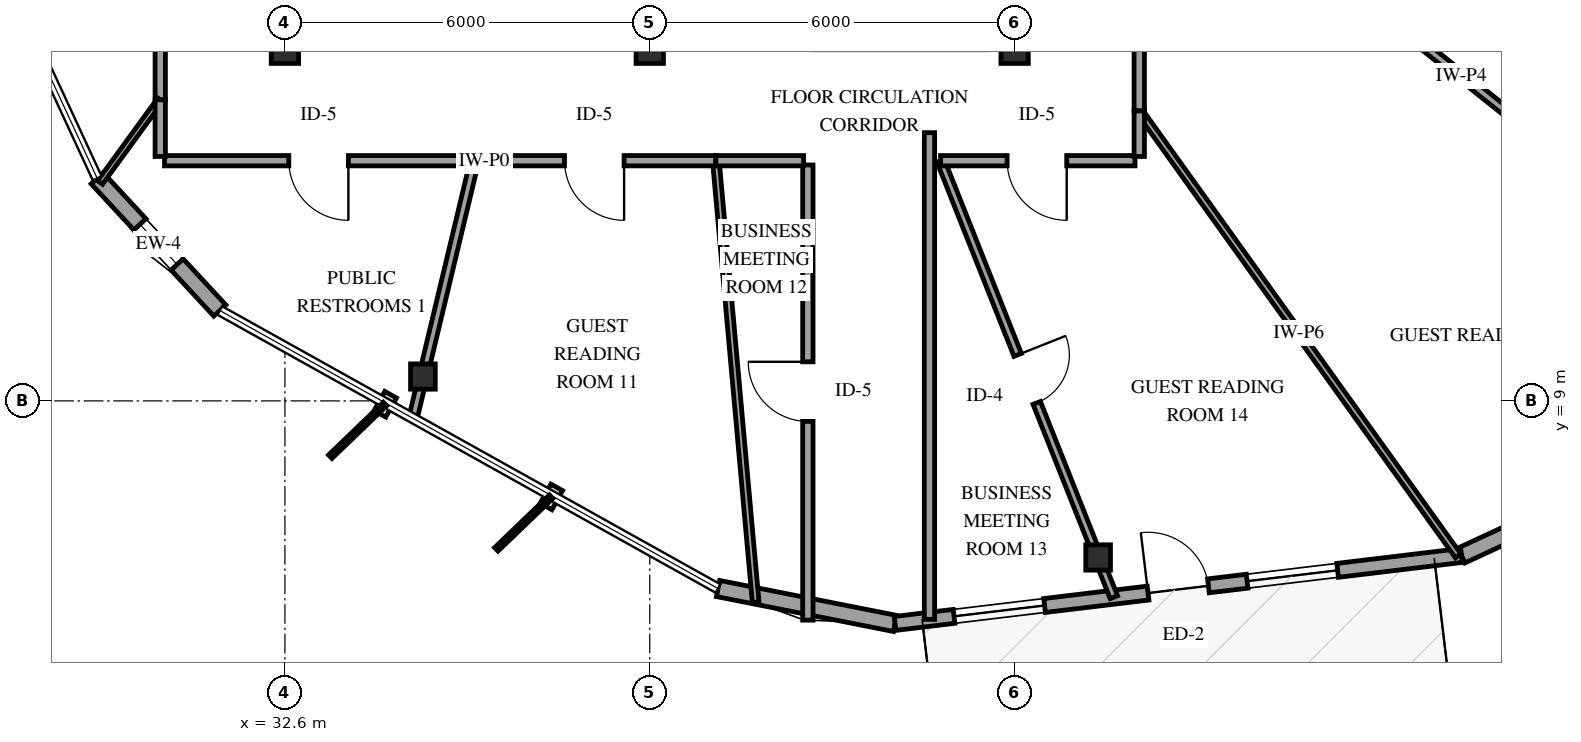
"""IFC4 building model, lengths in metres.
Left out: names, types, materials, properties, quantities, classifications, styles, units other than length and angle.
Written with IfcOpenShell. Run it as: python <this file> out.ifc"""

import sys

from ifc_helpers import new_model, si_unit, direction, frame, frame_2d, origin, origin_2d, place, context, subcontext, project, spatial, rectangle, i_section, extrude, element, fill, save


model = new_model("IFC4")
c1 = context("Model", 3, precision=1e-05, world=origin(), true_north=direction((0.0, 1.0)))
c2 = subcontext(c1, "Body", "Model", "MODEL_VIEW")
j1 = project(units=[si_unit("LENGTHUNIT", "METRE"), si_unit("PLANEANGLEUNIT", "RADIAN")], contexts=[c1])
p1 = place(None, origin())
s1 = spatial("IfcSite", under=j1, at=p1, CompositionType="ELEMENT")
p2 = place(p1, origin())
s2 = spatial("IfcBuilding", under=s1, at=p2, CompositionType="ELEMENT")
p3 = place(p2, frame((0.0, 0.0, 190.6)))
s3 = spatial("IfcBuildingStorey", under=s2, at=p3, CompositionType="ELEMENT", Elevation=190.6)
for number, where, z_axis, x_axis in (
    (1, (32.6, 15.0, -0.3), (0.0, 0.0, 1.0), (1.0, 0.0, 0.0)),
    (2, (38.6, 15.0, -0.3), (0.0, 0.0, 1.0), (1.0, 0.0, 0.0)),
    (3, (44.6, 15.0, -0.3), (0.0, 0.0, 1.0), (1.0, 0.0, 0.0)),
):
    element("IfcColumn", number, at=place(p3, frame(where, z_axis=z_axis, x_axis=x_axis)), inside=s3, PredefinedType="PILASTER", context=c2, shape_type="SweptSolid", body=[
        extrude(rectangle(XDim=0.45, YDim=0.9, at=origin_2d()), origin(), (0.0, 0.0, 1.0), 3.9),
    ])
for number, where, z_axis, x_axis in (
    (4, (34.87, 9.401, -0.3), (0.0, 0.0, 1.0), (1.0, 0.0, 0.0)),
    (5, (45.973, 6.426, -0.3), (0.0, 0.0, 1.0), (1.0, 0.0, 0.0)),
):
    element("IfcColumn", number, at=place(p3, frame(where, z_axis=z_axis, x_axis=x_axis)), inside=s3, PredefinedType="COLUMN", context=c2, shape_type="SweptSolid", body=[
        extrude(i_section(OverallWidth=0.406, OverallDepth=0.416, WebThickness=0.03, FlangeThickness=0.048, FilletRadius=0.038, at=origin_2d()), origin(), (0.0, 0.0, 1.0), 3.9),
    ])
p4 = place(p3, frame((29.513, 12.661, 0.0), z_axis=(0.0, 0.0, 1.0), x_axis=(0.679939563614, -0.733268156838, 0.0)))
e6 = element("IfcWall", 6, at=p4, inside=s3, PredefinedType="SOLIDWALL", context=c2, shape_type="SweptSolid", body=[
    extrude(rectangle(XDim=2.967, YDim=0.27, at=frame_2d((1.483, 0.0))), origin(), (0.0, 0.0, 1.0), 2.679),
])
p5 = place(p4, frame((1.033, 0.0, 0.75)))
e7 = element("IfcOpeningElement", 7, at=p5, cuts=e6, PredefinedType="OPENING", context=c2, shape_type="SweptSolid", body=[
    extrude(rectangle(XDim=0.9, YDim=1.5, at=frame_2d((0.45, 0.75))), frame((0.0, 0.145, 0.0), z_axis=(0.0, -1.0, 0.0), x_axis=(1.0, 0.0, 0.0)), (0.0, 0.0, 1.0), 0.29),
])
p6 = place(p3, frame((39.723, 5.915, 0.0), z_axis=(0.0, 0.0, 1.0), x_axis=(0.981090069254, -0.193551739883, 0.0)))
e8 = element("IfcWall", 8, at=p6, inside=s3, PredefinedType="SOLIDWALL", context=c2, shape_type="SweptSolid", body=[
    extrude(rectangle(XDim=2.967, YDim=0.27, at=frame_2d((1.483, 0.0))), origin(), (0.0, 0.0, 1.0), 2.679),
])
p7 = place(p3, frame((51.949, 6.458, 0.0), z_axis=(0.0, 0.0, 1.0), x_axis=(0.907501185291, 0.420049519337, 0.0)))
e9 = element("IfcWall", 9, at=p7, inside=s3, PredefinedType="SOLIDWALL", context=c2, shape_type="SweptSolid", body=[
    extrude(rectangle(XDim=2.967, YDim=0.27, at=frame_2d((1.483, 0.0))), origin(), (0.0, 0.0, 1.0), 2.679),
])
p8 = place(p7, frame((1.033, 0.0, 0.75)))
e10 = element("IfcOpeningElement", 10, at=p8, cuts=e9, PredefinedType="OPENING", context=c2, shape_type="SweptSolid", body=[
    extrude(rectangle(XDim=0.9, YDim=1.5, at=frame_2d((0.45, 0.75))), frame((0.0, 0.145, 0.0), z_axis=(0.0, -1.0, 0.0), x_axis=(1.0, 0.0, 0.0)), (0.0, 0.0, 1.0), 0.29),
])
p9 = place(p3, frame((42.634, 5.341, 0.0), z_axis=(0.0, 0.0, 1.0), x_axis=(0.992882132133, 0.119101098615, 0.0)))
e11 = element("IfcWall", 11, at=p9, inside=s3, PredefinedType="SOLIDWALL", context=c2, shape_type="SweptSolid", body=[
    extrude(rectangle(XDim=9.382, YDim=0.23, at=frame_2d((4.691, 0.0))), origin(), (0.0, 0.0, 1.0), 2.679),
])
p10 = place(p9, frame((4.191, 0.0, 0.0)))
e12 = element("IfcOpeningElement", 12, at=p10, cuts=e11, PredefinedType="OPENING", context=c2, shape_type="SweptSolid", body=[
    extrude(rectangle(XDim=1.0, YDim=2.15, at=frame_2d((0.5, 1.075))), frame((0.0, 0.125, 0.0), z_axis=(0.0, -1.0, 0.0), x_axis=(1.0, 0.0, 0.0)), (0.0, 0.0, 1.0), 0.25),
])
p11 = place(p9, frame((0.977, 0.0, 0.72)))
e13 = element("IfcOpeningElement", 13, at=p11, cuts=e11, PredefinedType="OPENING", context=c2, shape_type="SweptSolid", body=[
    extrude(rectangle(XDim=1.5, YDim=1.7, at=frame_2d((0.75, 0.85))), frame((0.0, 0.125, 0.0), z_axis=(0.0, -1.0, 0.0), x_axis=(1.0, 0.0, 0.0)), (0.0, 0.0, 1.0), 0.25),
])
p12 = place(p9, frame((5.831, 0.0, 0.72)))
e14 = element("IfcOpeningElement", 14, at=p12, cuts=e11, PredefinedType="OPENING", context=c2, shape_type="SweptSolid", body=[
    extrude(rectangle(XDim=1.5, YDim=1.7, at=frame_2d((0.75, 0.85))), frame((0.0, 0.125, 0.0), z_axis=(0.0, -1.0, 0.0), x_axis=(1.0, 0.0, 0.0)), (0.0, 0.0, 1.0), 0.25),
])
p13 = place(p3, frame((46.65, 21.405, 0.0), z_axis=(0.0, 0.0, 1.0), x_axis=(0.913073615339, -0.4077947682, 0.0)))
e15 = element("IfcWall", 15, at=p13, inside=s3, PredefinedType="PARTITIONING", context=c2, shape_type="SweptSolid", body=[
    extrude(rectangle(XDim=16.719, YDim=0.11, at=frame_2d((8.36, 0.0))), origin(), (0.0, 0.0, 1.0), 3.3),
])
p14 = place(p3, frame((46.65, 18.573, 0.0), z_axis=(0.0, 0.0, 1.0), x_axis=(0.781465935212, -0.623947908165, 0.0)))
e16 = element("IfcWall", 16, at=p14, inside=s3, PredefinedType="PARTITIONING", context=c2, shape_type="SweptSolid", body=[
    extrude(rectangle(XDim=13.554, YDim=0.14, at=frame_2d((6.777, 0.0))), origin(), (0.0, 0.0, 1.0), 3.3),
])
p15 = place(p3, frame((46.65, 13.769, 0.0), z_axis=(0.0, 0.0, 1.0), x_axis=(0.582553277152, -0.812792519207, 0.0)))
e17 = element("IfcWall", 17, at=p15, inside=s3, PredefinedType="PARTITIONING", context=c2, shape_type="SweptSolid", body=[
    extrude(rectangle(XDim=9.004, YDim=0.11, at=frame_2d((4.502, 0.0))), origin(), (0.0, 0.0, 1.0), 2.678),
])
p16 = place(p3, frame((43.383, 12.95, 0.0), z_axis=(0.0, 0.0, 1.0), x_axis=(0.3688984108, -0.929469721136, 0.0)))
e18 = element("IfcWall", 18, at=p16, inside=s3, PredefinedType="PARTITIONING", context=c2, shape_type="SweptSolid", body=[
    extrude(rectangle(XDim=7.723, YDim=0.13, at=frame_2d((3.861, 0.0))), origin(), (0.0, 0.0, 1.0), 2.595),
])
p17 = place(p16, frame((3.436, 0.0, 0.0)))
e19 = element("IfcOpeningElement", 19, at=p17, cuts=e18, PredefinedType="OPENING", context=c2, shape_type="SweptSolid", body=[
    extrude(rectangle(XDim=0.85, YDim=2.1, at=frame_2d((0.425, 1.05))), frame((0.0, 0.075, 0.0), z_axis=(0.0, -1.0, 0.0), x_axis=(1.0, 0.0, 0.0)), (0.0, 0.0, 1.0), 0.15),
])
p18 = place(p3, frame((41.2, 5.395, 0.0), z_axis=(0.0, 0.0, 1.0), x_axis=(0.0, 1.0, 0.0)))
e20 = element("IfcWall", 20, at=p18, inside=s3, PredefinedType="PARTITIONING", context=c2, shape_type="SweptSolid", body=[
    extrude(rectangle(XDim=7.485, YDim=0.17, at=frame_2d((3.742, 0.0))), origin(), (0.0, 0.0, 1.0), 3.3),
])
p19 = place(p18, frame((3.268, 0.0, 0.0)))
e21 = element("IfcOpeningElement", 21, at=p19, cuts=e20, PredefinedType="OPENING", context=c2, shape_type="SweptSolid", body=[
    extrude(rectangle(XDim=0.98, YDim=2.15, at=frame_2d((0.49, 1.075))), frame((0.0, 0.095, 0.0), z_axis=(0.0, -1.0, 0.0), x_axis=(1.0, 0.0, 0.0)), (0.0, 0.0, 1.0), 0.19),
])
p20 = place(p3, frame((39.687, 12.95, 0.0), z_axis=(0.0, 0.0, 1.0), x_axis=(0.089835321786, -0.995956633072, 0.0)))
e22 = element("IfcWall", 22, at=p20, inside=s3, PredefinedType="PARTITIONING", context=c2, shape_type="SweptSolid", body=[
    extrude(rectangle(XDim=7.292, YDim=0.11, at=frame_2d((3.646, 0.0))), origin(), (0.0, 0.0, 1.0), 2.678),
])
p21 = place(p3, frame((30.55, 13.951, 0.0), z_axis=(0.0, 0.0, 1.0), x_axis=(0.0, 1.0, 0.0)))
e23 = element("IfcWall", 23, at=p21, inside=s3, PredefinedType="PARTITIONING", context=c2, shape_type="SweptSolid", body=[
    extrude(rectangle(XDim=6.155, YDim=0.17, at=frame_2d((3.078, 0.0))), origin(), (0.0, 0.0, 1.0), 3.3),
])
p22 = place(p21, frame((2.603, 0.0, 0.0)))
e24 = element("IfcOpeningElement", 24, at=p22, cuts=e23, PredefinedType="OPENING", context=c2, shape_type="SweptSolid", body=[
    extrude(rectangle(XDim=0.98, YDim=2.15, at=frame_2d((0.49, 1.075))), frame((0.0, 0.095, 0.0), z_axis=(0.0, -1.0, 0.0), x_axis=(1.0, 0.0, 0.0)), (0.0, 0.0, 1.0), 0.19),
])
p23 = place(p3, frame((35.719, 12.95, 0.0), z_axis=(0.0, 0.0, 1.0), x_axis=(-1.0, 0.0, 0.0)))
e25 = element("IfcWall", 25, at=p23, inside=s3, PredefinedType="PARTITIONING", context=c2, shape_type="SweptSolid", body=[
    extrude(rectangle(XDim=5.099, YDim=0.17, at=frame_2d((2.549, 0.0))), origin(), (0.0, 0.0, 1.0), 3.3),
])
p24 = place(p23, frame((2.075, 0.0, 0.0)))
e26 = element("IfcOpeningElement", 26, at=p24, cuts=e25, PredefinedType="OPENING", context=c2, shape_type="SweptSolid", body=[
    extrude(rectangle(XDim=0.98, YDim=2.15, at=frame_2d((0.49, 1.075))), frame((0.0, 0.095, 0.0), z_axis=(0.0, -1.0, 0.0), x_axis=(1.0, 0.0, 0.0)), (0.0, 0.0, 1.0), 0.19),
])
p25 = place(p3, frame((46.65, 18.573, 0.0), z_axis=(0.0, 0.0, 1.0), x_axis=(0.0, -1.0, 0.0)))
e27 = element("IfcWall", 27, at=p25, inside=s3, PredefinedType="PARTITIONING", context=c2, shape_type="SweptSolid", body=[
    extrude(rectangle(XDim=4.804, YDim=0.17, at=frame_2d((2.402, 0.0))), origin(), (0.0, 0.0, 1.0), 3.3),
])
p26 = place(p25, frame((1.927, 0.0, 0.0)))
e28 = element("IfcOpeningElement", 28, at=p26, cuts=e27, PredefinedType="OPENING", context=c2, shape_type="SweptSolid", body=[
    extrude(rectangle(XDim=0.98, YDim=2.15, at=frame_2d((0.49, 1.075))), frame((0.0, 0.095, 0.0), z_axis=(0.0, -1.0, 0.0), x_axis=(1.0, 0.0, 0.0)), (0.0, 0.0, 1.0), 0.19),
])
p27 = place(p3, frame((35.719, 12.95, 0.0), z_axis=(0.0, 0.0, 1.0), x_axis=(-0.232789903954, -0.972527048784, 0.0)))
e29 = element("IfcWall", 29, at=p27, inside=s3, PredefinedType="PARTITIONING", context=c2, shape_type="SweptSolid", body=[
    extrude(rectangle(XDim=4.355, YDim=0.14, at=frame_2d((2.178, 0.0))), origin(), (0.0, 0.0, 1.0), 2.595),
])
p28 = place(p3, frame((39.687, 12.95, 0.0), z_axis=(0.0, 0.0, 1.0), x_axis=(-1.0, 0.0, 0.0)))
e30 = element("IfcWall", 30, at=p28, inside=s3, PredefinedType="PARTITIONING", context=c2, shape_type="SweptSolid", body=[
    extrude(rectangle(XDim=3.968, YDim=0.17, at=frame_2d((1.984, 0.0))), origin(), (0.0, 0.0, 1.0), 3.3),
])
p29 = place(p28, frame((1.509, 0.0, 0.0)))
e31 = element("IfcOpeningElement", 31, at=p29, cuts=e30, PredefinedType="OPENING", context=c2, shape_type="SweptSolid", body=[
    extrude(rectangle(XDim=0.98, YDim=2.15, at=frame_2d((0.49, 1.075))), frame((0.0, 0.095, 0.0), z_axis=(0.0, -1.0, 0.0), x_axis=(1.0, 0.0, 0.0)), (0.0, 0.0, 1.0), 0.19),
])
p30 = place(p3, frame((46.58, 12.95, 0.0), z_axis=(0.0, 0.0, 1.0), x_axis=(-1.0, 0.0, 0.0)))
e32 = element("IfcWall", 32, at=p30, inside=s3, PredefinedType="PARTITIONING", context=c2, shape_type="SweptSolid", body=[
    extrude(rectangle(XDim=3.197, YDim=0.17, at=frame_2d((1.599, 0.0))), origin(), (0.0, 0.0, 1.0), 3.3),
])
p31 = place(p30, frame((1.123, 0.0, 0.0)))
e33 = element("IfcOpeningElement", 33, at=p31, cuts=e32, PredefinedType="OPENING", context=c2, shape_type="SweptSolid", body=[
    extrude(rectangle(XDim=0.98, YDim=2.15, at=frame_2d((0.49, 1.075))), frame((0.0, 0.095, 0.0), z_axis=(0.0, -1.0, 0.0), x_axis=(1.0, 0.0, 0.0)), (0.0, 0.0, 1.0), 0.19),
])
p32 = place(p3, frame((30.55, 13.951, 0.0), z_axis=(0.0, 0.0, 1.0), x_axis=(-0.588836336306, -0.808252292942, 0.0)))
e34 = element("IfcWall", 34, at=p32, inside=s3, PredefinedType="PARTITIONING", context=c2, shape_type="SweptSolid", body=[
    extrude(rectangle(XDim=1.681, YDim=0.1, at=frame_2d((0.841, 0.0))), origin(), (0.0, 0.0, 1.0), 3.3),
])
p33 = place(p3, frame((41.13, 12.95, 0.0), z_axis=(0.0, 0.0, 1.0), x_axis=(-1.0, 0.0, 0.0)))
e35 = element("IfcWall", 35, at=p33, inside=s3, PredefinedType="PARTITIONING", context=c2, shape_type="SweptSolid", body=[
    extrude(rectangle(XDim=1.443, YDim=0.17, at=frame_2d((0.721, 0.0))), origin(), (0.0, 0.0, 1.0), 3.3),
])
p34 = place(p3, frame((30.55, 13.02, 0.0), z_axis=(0.0, 0.0, 1.0), x_axis=(0.0, 1.0, 0.0)))
e36 = element("IfcWall", 36, at=p34, inside=s3, PredefinedType="PARTITIONING", context=c2, shape_type="SweptSolid", body=[
    extrude(rectangle(XDim=0.931, YDim=0.17, at=frame_2d((0.465, 0.0))), origin(), (0.0, 0.0, 1.0), 3.3),
])
p35 = place(p3, frame((46.65, 13.769, 0.0), z_axis=(0.0, 0.0, 1.0), x_axis=(0.0, -1.0, 0.0)))
e37 = element("IfcWall", 37, at=p35, inside=s3, PredefinedType="PARTITIONING", context=c2, shape_type="SweptSolid", body=[
    extrude(rectangle(XDim=0.749, YDim=0.17, at=frame_2d((0.375, 0.0))), origin(), (0.0, 0.0, 1.0), 3.3),
])
p36 = place(p3, frame((43.2, 13.411, 0.0), z_axis=(0.0, 0.0, 1.0), x_axis=(0.0, -1.0, 0.0)))
e38 = element("IfcWall", 38, at=p36, inside=s3, PredefinedType="PARTITIONING", context=c2, shape_type="SweptSolid", body=[
    extrude(rectangle(XDim=8.003, YDim=0.17, at=frame_2d((4.001, 0.0))), origin(), (0.0, 0.0, 1.0), 3.3),
])
p37 = place(p5, origin())
e39 = element("IfcWindow", 39, at=p37, inside=s3, PartitioningType="SINGLE_PANEL", PredefinedType="WINDOW", context=c2, shape_type="SweptSolid", body=[
    extrude(rectangle(XDim=0.9, YDim=1.5, at=frame_2d((0.45, 0.75))), frame((0.0, 0.03, 0.0), z_axis=(0.0, -1.0, 0.0), x_axis=(1.0, 0.0, 0.0)), (0.0, 0.0, 1.0), 0.06),
])
fill(e7, e39)
p38 = place(p10, origin())
e40 = element("IfcDoor", 40, at=p38, inside=s3, OperationType="SINGLE_SWING_LEFT", PredefinedType="DOOR", context=c2, shape_type="SweptSolid", body=[
    extrude(rectangle(XDim=1.0, YDim=2.15, at=frame_2d((0.5, 1.075))), frame((0.0, 0.025, 0.0), z_axis=(0.0, -1.0, 0.0), x_axis=(1.0, 0.0, 0.0)), (0.0, 0.0, 1.0), 0.05),
])
fill(e12, e40)
p39 = place(p11, origin())
e41 = element("IfcWindow", 41, at=p39, inside=s3, PartitioningType="SINGLE_PANEL", PredefinedType="WINDOW", context=c2, shape_type="SweptSolid", body=[
    extrude(rectangle(XDim=1.5, YDim=1.7, at=frame_2d((0.75, 0.85))), frame((0.0, 0.03, 0.0), z_axis=(0.0, -1.0, 0.0), x_axis=(1.0, 0.0, 0.0)), (0.0, 0.0, 1.0), 0.06),
])
fill(e13, e41)
p40 = place(p12, origin())
e42 = element("IfcWindow", 42, at=p40, inside=s3, PartitioningType="SINGLE_PANEL", PredefinedType="WINDOW", context=c2, shape_type="SweptSolid", body=[
    extrude(rectangle(XDim=1.5, YDim=1.7, at=frame_2d((0.75, 0.85))), frame((0.0, 0.03, 0.0), z_axis=(0.0, -1.0, 0.0), x_axis=(1.0, 0.0, 0.0)), (0.0, 0.0, 1.0), 0.06),
])
fill(e14, e42)
p41 = place(p17, origin())
e43 = element("IfcDoor", 43, at=p41, inside=s3, OperationType="SINGLE_SWING_LEFT", PredefinedType="DOOR", context=c2, shape_type="SweptSolid", body=[
    extrude(rectangle(XDim=0.85, YDim=2.1, at=frame_2d((0.425, 1.05))), frame((0.0, 0.025, 0.0), z_axis=(0.0, -1.0, 0.0), x_axis=(1.0, 0.0, 0.0)), (0.0, 0.0, 1.0), 0.05),
])
fill(e19, e43)
p42 = place(p19, origin())
e44 = element("IfcDoor", 44, at=p42, inside=s3, OperationType="SINGLE_SWING_RIGHT", PredefinedType="DOOR", context=c2, shape_type="SweptSolid", body=[
    extrude(rectangle(XDim=0.98, YDim=2.15, at=frame_2d((0.49, 1.075))), frame((0.0, 0.025, 0.0), z_axis=(0.0, -1.0, 0.0), x_axis=(1.0, 0.0, 0.0)), (0.0, 0.0, 1.0), 0.05),
])
fill(e21, e44)
p43 = place(p24, origin())
e45 = element("IfcDoor", 45, at=p43, inside=s3, OperationType="SINGLE_SWING_LEFT", PredefinedType="DOOR", context=c2, shape_type="SweptSolid", body=[
    extrude(rectangle(XDim=0.98, YDim=2.15, at=frame_2d((0.49, 1.075))), frame((0.0, 0.025, 0.0), z_axis=(0.0, -1.0, 0.0), x_axis=(1.0, 0.0, 0.0)), (0.0, 0.0, 1.0), 0.05),
])
fill(e26, e45)
p44 = place(p29, origin())
e46 = element("IfcDoor", 46, at=p44, inside=s3, OperationType="SINGLE_SWING_LEFT", PredefinedType="DOOR", context=c2, shape_type="SweptSolid", body=[
    extrude(rectangle(XDim=0.98, YDim=2.15, at=frame_2d((0.49, 1.075))), frame((0.0, 0.025, 0.0), z_axis=(0.0, -1.0, 0.0), x_axis=(1.0, 0.0, 0.0)), (0.0, 0.0, 1.0), 0.05),
])
fill(e31, e46)
p45 = place(p31, origin())
e47 = element("IfcDoor", 47, at=p45, inside=s3, OperationType="SINGLE_SWING_LEFT", PredefinedType="DOOR", context=c2, shape_type="SweptSolid", body=[
    extrude(rectangle(XDim=0.98, YDim=2.15, at=frame_2d((0.49, 1.075))), frame((0.0, 0.025, 0.0), z_axis=(0.0, -1.0, 0.0), x_axis=(1.0, 0.0, 0.0)), (0.0, 0.0, 1.0), 0.05),
])
fill(e33, e47)
save(model, sys.argv[1])
